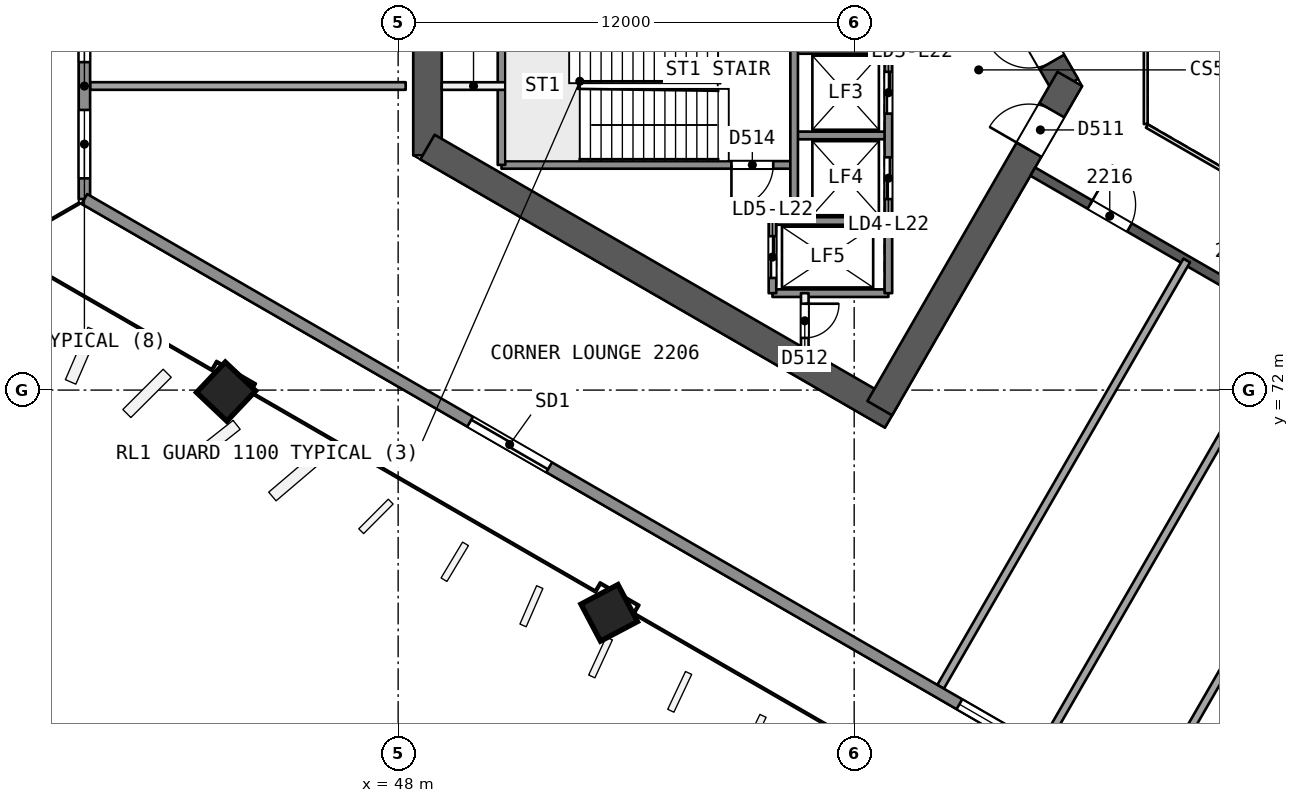
"""IFC4 building model, lengths in metres.
Left out: names, types, materials, properties, quantities, classifications, styles, units other than length and angle.
Written with IfcOpenShell. Run it as: python <this file> out.ifc"""

import sys

from ifc_helpers import new_model, si_unit, direction, frame, frame_2d, origin, origin_2d, place, context, subcontext, project, spatial, rectangle, extrude, element, fill, save


model = new_model("IFC4")
c1 = context("Model", 3, precision=1e-05, world=origin(), true_north=direction((0.0, 1.0)))
c2 = subcontext(c1, "Body", "Model", "MODEL_VIEW")
j1 = project(units=[si_unit("LENGTHUNIT", "METRE"), si_unit("PLANEANGLEUNIT", "RADIAN")], contexts=[c1])
p1 = place(None, origin())
s1 = spatial("IfcSite", under=j1, at=p1, CompositionType="ELEMENT")
p2 = place(p1, origin())
s2 = spatial("IfcBuilding", under=s1, at=p2, CompositionType="ELEMENT")
p3 = place(p2, frame((0.0, 0.0, 94.3)))
s3 = spatial("IfcBuildingStorey", under=s2, at=p3, CompositionType="ELEMENT", Elevation=94.3)
p4 = place(p3, frame((65.567, 80.0, 0.0), z_axis=(0.0, 0.0, 1.0), x_axis=(-0.499988615364, 0.866031976607, 0.0)))
e1 = element("IfcWall", 1, at=p4, inside=s3, PredefinedType="SHEAR", context=c2, shape_type="SweptSolid", body=[
    extrude(rectangle(XDim=10.163, YDim=0.75, at=frame_2d((5.082, 0.0))), origin(), (0.0, 0.0, 1.0), 3.7),
])
p5 = place(p4, frame((0.733, 0.0, 0.0)))
e2 = element("IfcOpeningElement", 2, at=p5, cuts=e1, PredefinedType="OPENING", context=c2, shape_type="SweptSolid", body=[
    extrude(rectangle(XDim=1.2, YDim=2.1, at=frame_2d((0.6, 1.05))), frame((0.0, 0.385, 0.0), z_axis=(0.0, -1.0, 0.0), x_axis=(1.0, 0.0, 0.0)), (0.0, 0.0, 1.0), 0.771),
])
p6 = place(p3, frame((48.772, 81.606, 0.0), z_axis=(0.0, 0.0, 1.0), x_axis=(0.0, -1.0, 0.0)))
e3 = element("IfcWall", 3, at=p6, inside=s3, PredefinedType="SHEAR", context=c2, shape_type="SweptSolid", body=[
    extrude(rectangle(XDim=3.429, YDim=0.75, at=frame_2d((1.714, 0.0))), origin(), (0.0, 0.0, 1.0), 3.7),
])
p7 = place(p3, frame((48.772, 78.394, 0.0), z_axis=(0.0, 0.0, 1.0), x_axis=(0.866028339916, -0.499994914436, 0.0)))
e4 = element("IfcWall", 4, at=p7, inside=s3, PredefinedType="SHEAR", context=c2, shape_type="SweptSolid", body=[
    extrude(rectangle(XDim=14.117, YDim=0.75, at=frame_2d((7.059, 0.0))), origin(), (0.0, 0.0, 1.0), 3.7),
])
p8 = place(p3, frame((60.673, 71.523, 0.0), z_axis=(0.0, 0.0, 1.0), x_axis=(0.499997052475, 0.866027105532, 0.0)))
e5 = element("IfcWall", 5, at=p8, inside=s3, PredefinedType="SHEAR", context=c2, shape_type="SweptSolid", body=[
    extrude(rectangle(XDim=10.005, YDim=0.75, at=frame_2d((5.002, 0.0))), origin(), (0.0, 0.0, 1.0), 3.7),
])
p9 = place(p8, frame((7.855, 0.0, 0.0)))
e6 = element("IfcOpeningElement", 6, at=p9, cuts=e5, PredefinedType="OPENING", context=c2, shape_type="SweptSolid", body=[
    extrude(rectangle(XDim=1.2, YDim=2.1, at=frame_2d((0.6, 1.05))), frame((0.0, 0.385, 0.0), z_axis=(0.0, -1.0, 0.0), x_axis=(1.0, 0.0, 0.0)), (0.0, 0.0, 1.0), 0.771),
])
p10 = place(p3, frame((64.7, 77.748, 0.0), z_axis=(0.0, 0.0, 1.0), x_axis=(0.866026492143, -0.499998114903, 0.0)))
e7 = element("IfcWall", 7, at=p10, inside=s3, PredefinedType="SHEAR", context=c2, shape_type="SweptSolid", body=[
    extrude(rectangle(XDim=15.588, YDim=0.25, at=frame_2d((7.794, 0.0))), origin(), (0.0, 0.0, 1.0), 3.25),
])
p11 = place(p10, frame((1.738, 0.0, 0.0)))
e8 = element("IfcOpeningElement", 8, at=p11, cuts=e7, PredefinedType="OPENING", context=c2, shape_type="SweptSolid", body=[
    extrude(rectangle(XDim=1.2, YDim=2.4, at=frame_2d((0.6, 1.2))), frame((0.0, 0.135, 0.0), z_axis=(0.0, -1.0, 0.0), x_axis=(1.0, 0.0, 0.0)), (0.0, 0.0, 1.0), 0.271),
])
p12 = place(p10, frame((5.785, 0.0, 0.0)))
e9 = element("IfcOpeningElement", 9, at=p12, cuts=e7, PredefinedType="OPENING", context=c2, shape_type="SweptSolid", body=[
    extrude(rectangle(XDim=0.9, YDim=2.1, at=frame_2d((0.45, 1.05))), frame((0.0, 0.135, 0.0), z_axis=(0.0, -1.0, 0.0), x_axis=(1.0, 0.0, 0.0)), (0.0, 0.0, 1.0), 0.271),
])
p13 = place(p10, frame((8.903, 0.0, 0.0)))
e10 = element("IfcOpeningElement", 10, at=p13, cuts=e7, PredefinedType="OPENING", context=c2, shape_type="SweptSolid", body=[
    extrude(rectangle(XDim=0.9, YDim=2.1, at=frame_2d((0.45, 1.05))), frame((0.0, 0.135, 0.0), z_axis=(0.0, -1.0, 0.0), x_axis=(1.0, 0.0, 0.0)), (0.0, 0.0, 1.0), 0.271),
])
p14 = place(p10, frame((12.75, 0.0, 0.0)))
e11 = element("IfcOpeningElement", 11, at=p14, cuts=e7, PredefinedType="OPENING", context=c2, shape_type="SweptSolid", body=[
    extrude(rectangle(XDim=1.0, YDim=2.1, at=frame_2d((0.5, 1.05))), frame((0.0, 0.135, 0.0), z_axis=(0.0, -1.0, 0.0), x_axis=(1.0, 0.0, 0.0)), (0.0, 0.0, 1.0), 0.271),
])
p15 = place(p3, frame((43.438, 71.951, 0.0), z_axis=(0.02855911485, 0.006793507689, 0.999569019734), x_axis=(-0.865319840559, 0.500766443848, 0.021319996519)))
e12 = element("IfcColumn", 12, at=p15, inside=s3, PredefinedType="COLUMN", context=c2, shape_type="SweptSolid", body=[
    extrude(rectangle(XDim=1.1, YDim=1.1, at=origin_2d()), origin(), (0.0, 0.0, 1.0), 3.702),
])
p16 = place(p3, frame((53.531, 66.124, 0.0), z_axis=(0.019262573858, 0.012138060239, 0.999740776773), x_axis=(-0.866459679623, 0.499133780995, 0.010634484378)))
e13 = element("IfcColumn", 13, at=p16, inside=s3, PredefinedType="COLUMN", context=c2, shape_type="SweptSolid", body=[
    extrude(rectangle(XDim=1.1, YDim=1.1, at=origin_2d()), origin(), (0.0, 0.0, 1.0), 3.701),
])
p17 = place(p3, frame((39.893, 80.001, 0.0), z_axis=(0.0, 0.0, 1.0), x_axis=(1.0, 0.0, 0.0)))
e14 = element("IfcWall", 14, at=p17, inside=s3, PredefinedType="PARTITIONING", context=c2, shape_type="SweptSolid", body=[
    extrude(rectangle(XDim=8.305, YDim=0.2, at=frame_2d((4.152, 0.0))), origin(), (0.0, 0.0, 1.0), 3.25),
])
for number, where, z_axis, x_axis in (
    (15, (62.274, 64.193, 0.0), (0.0, 0.0, 1.0), (0.5, 0.866, 0.0)),
    (16, (64.974, 62.634, 0.0), (0.0, 0.0, 1.0), (0.5, 0.866, 0.0)),
    (17, (67.674, 61.075, 0.0), (0.0, 0.0, 1.0), (0.5, 0.866, 0.0)),
):
    element("IfcWall", number, at=place(p3, frame(where, z_axis=z_axis, x_axis=x_axis)), inside=s3, PredefinedType="PARTITIONING", context=c2, shape_type="SweptSolid", body=[
        extrude(rectangle(XDim=12.953, YDim=0.2, at=frame_2d((6.477, 0.0))), origin(), (0.0, 0.0, 1.0), 3.25),
    ])
p18 = place(p3, frame((39.744, 77.028, 0.0), z_axis=(0.0, 0.0, 1.0), x_axis=(0.0, 1.0, 0.0)))
e18 = element("IfcWall", 18, at=p18, inside=s3, PredefinedType="SOLIDWALL", context=c2, shape_type="SweptSolid", body=[
    extrude(rectangle(XDim=5.944, YDim=0.3, at=frame_2d((2.972, 0.0))), origin(), (0.0, 0.0, 1.0), 3.25),
])
p19 = place(p18, frame((0.543, 0.0, 0.9)))
e19 = element("IfcOpeningElement", 19, at=p19, cuts=e18, PredefinedType="OPENING", context=c2, shape_type="SweptSolid", body=[
    extrude(rectangle(XDim=1.8, YDim=1.5, at=frame_2d((0.9, 0.75))), frame((0.0, 0.161, 0.0), z_axis=(0.0, -1.0, 0.0), x_axis=(1.0, 0.0, 0.0)), (0.0, 0.0, 1.0), 0.321),
])
p20 = place(p18, frame((3.601, 0.0, 0.9)))
e20 = element("IfcOpeningElement", 20, at=p20, cuts=e18, PredefinedType="OPENING", context=c2, shape_type="SweptSolid", body=[
    extrude(rectangle(XDim=1.8, YDim=1.5, at=frame_2d((0.9, 0.75))), frame((0.0, 0.161, 0.0), z_axis=(0.0, -1.0, 0.0), x_axis=(1.0, 0.0, 0.0)), (0.0, 0.0, 1.0), 0.321),
])
p21 = place(p3, frame((90.054, 47.981, 0.0), z_axis=(0.0, 0.0, 1.0), x_axis=(-0.866025390357, 0.500000023256, 0.0)))
e21 = element("IfcWall", 21, at=p21, inside=s3, PredefinedType="SOLIDWALL", context=c2, shape_type="SweptSolid", body=[
    extrude(rectangle(XDim=58.093, YDim=0.3, at=frame_2d((29.046, 0.0))), origin(), (0.0, 0.0, 1.0), 3.25),
])
p22 = place(p21, frame((43.972, 0.0, 0.0)))
e22 = element("IfcOpeningElement", 22, at=p22, cuts=e21, PredefinedType="OPENING", context=c2, shape_type="SweptSolid", body=[
    extrude(rectangle(XDim=2.4, YDim=2.4, at=frame_2d((1.2, 1.2))), frame((0.0, 0.161, 0.0), z_axis=(0.0, -1.0, 0.0), x_axis=(1.0, 0.0, 0.0)), (0.0, 0.0, 1.0), 0.321),
])
p23 = place(p21, frame((22.39, 0.0, 0.0)))
e23 = element("IfcOpeningElement", 23, at=p23, cuts=e21, PredefinedType="OPENING", context=c2, shape_type="SweptSolid", body=[
    extrude(rectangle(XDim=2.4, YDim=2.4, at=frame_2d((1.2, 1.2))), frame((0.0, 0.161, 0.0), z_axis=(0.0, -1.0, 0.0), x_axis=(1.0, 0.0, 0.0)), (0.0, 0.0, 1.0), 0.321),
])
p24 = place(p21, frame((10.643, 0.0, 0.0)))
e24 = element("IfcOpeningElement", 24, at=p24, cuts=e21, PredefinedType="OPENING", context=c2, shape_type="SweptSolid", body=[
    extrude(rectangle(XDim=2.4, YDim=2.4, at=frame_2d((1.2, 1.2))), frame((0.0, 0.161, 0.0), z_axis=(0.0, -1.0, 0.0), x_axis=(1.0, 0.0, 0.0)), (0.0, 0.0, 1.0), 0.321),
])
p25 = place(p21, frame((29.705, 0.0, 0.9)))
e25 = element("IfcOpeningElement", 25, at=p25, cuts=e21, PredefinedType="OPENING", context=c2, shape_type="SweptSolid", body=[
    extrude(rectangle(XDim=1.8, YDim=1.5, at=frame_2d((0.9, 0.75))), frame((0.0, 0.161, 0.0), z_axis=(0.0, -1.0, 0.0), x_axis=(1.0, 0.0, 0.0)), (0.0, 0.0, 1.0), 0.321),
])
p26 = place(p21, frame((26.587, 0.0, 0.9)))
e26 = element("IfcOpeningElement", 26, at=p26, cuts=e21, PredefinedType="OPENING", context=c2, shape_type="SweptSolid", body=[
    extrude(rectangle(XDim=1.8, YDim=1.5, at=frame_2d((0.9, 0.75))), frame((0.0, 0.161, 0.0), z_axis=(0.0, -1.0, 0.0), x_axis=(1.0, 0.0, 0.0)), (0.0, 0.0, 1.0), 0.321),
])
p27 = place(p3, frame((60.9, 80.95, 0.0), z_axis=(0.0, 0.0, 1.0), x_axis=(-1.0, 0.0, 0.0)))
e27 = element("IfcWall", 27, at=p27, inside=s3, PredefinedType="SOLIDWALL", context=c2, shape_type="SweptSolid", body=[
    extrude(rectangle(XDim=2.48, YDim=0.2, at=frame_2d((1.24, 0.0))), origin(), (0.0, 0.0, 1.0), 3.25),
])
p28 = place(p3, frame((50.82, 80.0, 0.0), z_axis=(0.0, 0.0, 1.0), x_axis=(-1.0, 0.0, 0.0)))
e28 = element("IfcWall", 28, at=p28, inside=s3, PredefinedType="PARTITIONING", context=c2, shape_type="SweptSolid", body=[
    extrude(rectangle(XDim=1.673, YDim=0.2, at=frame_2d((0.836, 0.0))), origin(), (0.0, 0.0, 1.0), 3.25),
])
p29 = place(p3, frame((60.9, 78.7, 0.0), z_axis=(0.0, 0.0, 1.0), x_axis=(-1.0, 0.0, 0.0)))
e29 = element("IfcWall", 29, at=p29, inside=s3, PredefinedType="SOLIDWALL", context=c2, shape_type="SweptSolid", body=[
    extrude(rectangle(XDim=2.48, YDim=0.2, at=frame_2d((1.24, 0.0))), origin(), (0.0, 0.0, 1.0), 3.25),
])
p30 = place(p3, frame((58.42, 77.925, 0.0), z_axis=(0.0, 0.0, 1.0), x_axis=(-1.0, 0.0, 0.0)))
e30 = element("IfcWall", 30, at=p30, inside=s3, PredefinedType="SOLIDWALL", context=c2, shape_type="SweptSolid", body=[
    extrude(rectangle(XDim=7.7, YDim=0.2, at=frame_2d((3.85, 0.0))), origin(), (0.0, 0.0, 1.0), 3.25),
])
p31 = place(p30, frame((0.55, 0.0, 0.0)))
e31 = element("IfcOpeningElement", 31, at=p31, cuts=e30, PredefinedType="OPENING", context=c2, shape_type="SweptSolid", body=[
    extrude(rectangle(XDim=1.1, YDim=2.1, at=frame_2d((0.55, 1.05))), frame((0.0, 0.11, 0.0), z_axis=(0.0, -1.0, 0.0), x_axis=(1.0, 0.0, 0.0)), (0.0, 0.0, 1.0), 0.221),
])
for number, where, z_axis, x_axis in (
    (32, (60.9, 76.45, 0.0), (0.0, 0.0, 1.0), (-1.0, 0.0, 0.0)),
    (33, (60.9, 74.55, 0.0), (0.0, 0.0, 1.0), (-1.0, 0.0, 0.0)),
):
    element("IfcWall", number, at=place(p3, frame(where, z_axis=z_axis, x_axis=x_axis)), inside=s3, PredefinedType="SOLIDWALL", context=c2, shape_type="SweptSolid", body=[
        extrude(rectangle(XDim=3.05, YDim=0.2, at=frame_2d((1.525, 0.0))), origin(), (0.0, 0.0, 1.0), 3.25),
    ])
p32 = place(p3, frame((60.9, 85.45, 0.0), z_axis=(0.0, 0.0, 1.0), x_axis=(0.0, -1.0, 0.0)))
e34 = element("IfcWall", 34, at=p32, inside=s3, PredefinedType="SOLIDWALL", context=c2, shape_type="SweptSolid", body=[
    extrude(rectangle(XDim=10.9, YDim=0.2, at=frame_2d((5.45, 0.0))), origin(), (0.0, 0.0, 1.0), 3.25),
])
p33 = place(p32, frame((0.575, 0.0, 0.0)))
e35 = element("IfcOpeningElement", 35, at=p33, cuts=e34, PredefinedType="OPENING", context=c2, shape_type="SweptSolid", body=[
    extrude(rectangle(XDim=1.1, YDim=2.1, at=frame_2d((0.55, 1.05))), frame((0.0, 0.11, 0.0), z_axis=(0.0, -1.0, 0.0), x_axis=(1.0, 0.0, 0.0)), (0.0, 0.0, 1.0), 0.221),
])
p34 = place(p32, frame((2.825, 0.0, 0.0)))
e36 = element("IfcOpeningElement", 36, at=p34, cuts=e34, PredefinedType="OPENING", context=c2, shape_type="SweptSolid", body=[
    extrude(rectangle(XDim=1.1, YDim=2.1, at=frame_2d((0.55, 1.05))), frame((0.0, 0.11, 0.0), z_axis=(0.0, -1.0, 0.0), x_axis=(1.0, 0.0, 0.0)), (0.0, 0.0, 1.0), 0.221),
])
p35 = place(p32, frame((5.075, 0.0, 0.0)))
e37 = element("IfcOpeningElement", 37, at=p35, cuts=e34, PredefinedType="OPENING", context=c2, shape_type="SweptSolid", body=[
    extrude(rectangle(XDim=1.1, YDim=2.1, at=frame_2d((0.55, 1.05))), frame((0.0, 0.11, 0.0), z_axis=(0.0, -1.0, 0.0), x_axis=(1.0, 0.0, 0.0)), (0.0, 0.0, 1.0), 0.221),
])
p36 = place(p32, frame((7.325, 0.0, 0.0)))
e38 = element("IfcOpeningElement", 38, at=p36, cuts=e34, PredefinedType="OPENING", context=c2, shape_type="SweptSolid", body=[
    extrude(rectangle(XDim=1.1, YDim=2.1, at=frame_2d((0.55, 1.05))), frame((0.0, 0.11, 0.0), z_axis=(0.0, -1.0, 0.0), x_axis=(1.0, 0.0, 0.0)), (0.0, 0.0, 1.0), 0.221),
])
p37 = place(p3, frame((58.7, 74.55, 0.0), z_axis=(0.0, 0.0, 1.0), x_axis=(0.0, -1.0, 0.0)))
e39 = element("IfcWall", 39, at=p37, inside=s3, PredefinedType="PARTITIONING", context=c2, shape_type="SweptSolid", body=[
    extrude(rectangle(XDim=1.455, YDim=0.2, at=frame_2d((0.728, 0.0))), origin(), (0.0, 0.0, 1.0), 3.25),
])
p38 = place(p37, frame((0.278, 0.0, 0.0)))
e40 = element("IfcOpeningElement", 40, at=p38, cuts=e39, PredefinedType="OPENING", context=c2, shape_type="SweptSolid", body=[
    extrude(rectangle(XDim=0.9, YDim=2.1, at=frame_2d((0.45, 1.05))), frame((0.0, 0.11, 0.0), z_axis=(0.0, -1.0, 0.0), x_axis=(1.0, 0.0, 0.0)), (0.0, 0.0, 1.0), 0.221),
])
p39 = place(p3, frame((58.42, 85.45, 0.0), z_axis=(0.0, 0.0, 1.0), x_axis=(0.0, -1.0, 0.0)))
e41 = element("IfcWall", 41, at=p39, inside=s3, PredefinedType="SOLIDWALL", context=c2, shape_type="SweptSolid", body=[
    extrude(rectangle(XDim=9.0, YDim=0.2, at=frame_2d((4.5, 0.0))), origin(), (0.0, 0.0, 1.0), 3.25),
])
p40 = place(p3, frame((57.85, 76.45, 0.0), z_axis=(0.0, 0.0, 1.0), x_axis=(0.0, -1.0, 0.0)))
e42 = element("IfcWall", 42, at=p40, inside=s3, PredefinedType="SOLIDWALL", context=c2, shape_type="SweptSolid", body=[
    extrude(rectangle(XDim=1.9, YDim=0.2, at=frame_2d((0.95, 0.0))), origin(), (0.0, 0.0, 1.0), 3.25),
])
p41 = place(p40, frame((0.4, 0.0, 0.0)))
e43 = element("IfcOpeningElement", 43, at=p41, cuts=e42, PredefinedType="OPENING", context=c2, shape_type="SweptSolid", body=[
    extrude(rectangle(XDim=1.1, YDim=2.1, at=frame_2d((0.55, 1.05))), frame((0.0, 0.11, 0.0), z_axis=(0.0, -1.0, 0.0), x_axis=(1.0, 0.0, 0.0)), (0.0, 0.0, 1.0), 0.221),
])
p42 = place(p3, frame((50.72, 82.075, 0.0), z_axis=(0.0, 0.0, 1.0), x_axis=(0.0, -1.0, 0.0)))
e44 = element("IfcWall", 44, at=p42, inside=s3, PredefinedType="SOLIDWALL", context=c2, shape_type="SweptSolid", body=[
    extrude(rectangle(XDim=4.15, YDim=0.2, at=frame_2d((2.075, 0.0))), origin(), (0.0, 0.0, 1.0), 3.25),
])
p43 = place(p3, frame((67.672, 81.0, 0.0), z_axis=(0.0, 0.0, 1.0), x_axis=(0.0, -1.0, 0.0)))
e45 = element("IfcWall", 45, at=p43, inside=s3, PredefinedType="PARTITIONING", context=c2, shape_type="SweptSolid", body=[
    extrude(rectangle(XDim=2.0, YDim=0.1, at=frame_2d((1.0, 0.0))), origin(), (0.0, 0.0, 1.0), 3.25),
])
p44 = place(p3, frame((67.702, 78.948, 0.0), z_axis=(0.0, 0.0, 1.0), x_axis=(0.866026658274, -0.499997827154, 0.0)))
e46 = element("IfcWall", 46, at=p44, inside=s3, PredefinedType="PARTITIONING", context=c2, shape_type="SweptSolid", body=[
    extrude(rectangle(XDim=11.588, YDim=0.1, at=frame_2d((5.794, 0.0))), origin(), (0.0, 0.0, 1.0), 3.25),
])
p45 = place(p11, origin())
e47 = element("IfcDoor", 47, at=p45, inside=s3, OperationType="SINGLE_SWING_LEFT", PredefinedType="NOTDEFINED", context=c2, shape_type="SweptSolid", body=[
    extrude(rectangle(XDim=1.2, YDim=2.4, at=frame_2d((0.6, 1.2))), frame((0.0, 0.025, 0.0), z_axis=(0.0, -1.0, 0.0), x_axis=(1.0, 0.0, 0.0)), (0.0, 0.0, 1.0), 0.05),
])
fill(e8, e47)
p46 = place(p19, origin())
e48 = element("IfcWindow", 48, at=p46, inside=s3, PartitioningType="SINGLE_PANEL", PredefinedType="WINDOW", context=c2, shape_type="SweptSolid", body=[
    extrude(rectangle(XDim=1.8, YDim=1.5, at=frame_2d((0.9, 0.75))), frame((0.0, 0.03, 0.0), z_axis=(0.0, -1.0, 0.0), x_axis=(1.0, 0.0, 0.0)), (0.0, 0.0, 1.0), 0.06),
])
fill(e19, e48)
p47 = place(p20, origin())
e49 = element("IfcWindow", 49, at=p47, inside=s3, PartitioningType="SINGLE_PANEL", PredefinedType="WINDOW", context=c2, shape_type="SweptSolid", body=[
    extrude(rectangle(XDim=1.8, YDim=1.5, at=frame_2d((0.9, 0.75))), frame((0.0, 0.03, 0.0), z_axis=(0.0, -1.0, 0.0), x_axis=(1.0, 0.0, 0.0)), (0.0, 0.0, 1.0), 0.06),
])
fill(e20, e49)
p48 = place(p22, origin())
e50 = element("IfcDoor", 50, at=p48, inside=s3, OperationType="SLIDING_TO_LEFT", PredefinedType="NOTDEFINED", context=c2, shape_type="SweptSolid", body=[
    extrude(rectangle(XDim=2.4, YDim=2.4, at=frame_2d((1.2, 1.2))), frame((0.0, 0.025, 0.0), z_axis=(0.0, -1.0, 0.0), x_axis=(1.0, 0.0, 0.0)), (0.0, 0.0, 1.0), 0.05),
])
fill(e22, e50)
p49 = place(p25, origin())
e51 = element("IfcWindow", 51, at=p49, inside=s3, PartitioningType="SINGLE_PANEL", PredefinedType="WINDOW", context=c2, shape_type="SweptSolid", body=[
    extrude(rectangle(XDim=1.8, YDim=1.5, at=frame_2d((0.9, 0.75))), frame((0.0, 0.03, 0.0), z_axis=(0.0, -1.0, 0.0), x_axis=(1.0, 0.0, 0.0)), (0.0, 0.0, 1.0), 0.06),
])
fill(e25, e51)
p50 = place(p5, origin())
e52 = element("IfcDoor", 52, at=p50, inside=s3, OperationType="SINGLE_SWING_RIGHT", PredefinedType="NOTDEFINED", context=c2, shape_type="SweptSolid", body=[
    extrude(rectangle(XDim=1.2, YDim=2.1, at=frame_2d((0.6, 1.05))), frame((0.0, 0.025, 0.0), z_axis=(0.0, -1.0, 0.0), x_axis=(1.0, 0.0, 0.0)), (0.0, 0.0, 1.0), 0.05),
])
fill(e2, e52)
p51 = place(p9, origin())
e53 = element("IfcDoor", 53, at=p51, inside=s3, OperationType="SINGLE_SWING_LEFT", PredefinedType="NOTDEFINED", context=c2, shape_type="SweptSolid", body=[
    extrude(rectangle(XDim=1.2, YDim=2.1, at=frame_2d((0.6, 1.05))), frame((0.0, 0.025, 0.0), z_axis=(0.0, -1.0, 0.0), x_axis=(1.0, 0.0, 0.0)), (0.0, 0.0, 1.0), 0.05),
])
fill(e6, e53)
p52 = place(p35, origin())
e54 = element("IfcDoor", 54, at=p52, inside=s3, OperationType="SLIDING_TO_RIGHT", PredefinedType="NOTDEFINED", context=c2, shape_type="SweptSolid", body=[
    extrude(rectangle(XDim=1.1, YDim=2.1, at=frame_2d((0.55, 1.05))), frame((0.0, 0.025, 0.0), z_axis=(0.0, -1.0, 0.0), x_axis=(1.0, 0.0, 0.0)), (0.0, 0.0, 1.0), 0.05),
])
fill(e37, e54)
p53 = place(p36, origin())
e55 = element("IfcDoor", 55, at=p53, inside=s3, OperationType="SLIDING_TO_LEFT", PredefinedType="NOTDEFINED", context=c2, shape_type="SweptSolid", body=[
    extrude(rectangle(XDim=1.1, YDim=2.1, at=frame_2d((0.55, 1.05))), frame((0.0, 0.025, 0.0), z_axis=(0.0, -1.0, 0.0), x_axis=(1.0, 0.0, 0.0)), (0.0, 0.0, 1.0), 0.05),
])
fill(e38, e55)
p54 = place(p41, origin())
e56 = element("IfcDoor", 56, at=p54, inside=s3, OperationType="SLIDING_TO_RIGHT", PredefinedType="NOTDEFINED", context=c2, shape_type="SweptSolid", body=[
    extrude(rectangle(XDim=1.1, YDim=2.1, at=frame_2d((0.55, 1.05))), frame((0.0, 0.025, 0.0), z_axis=(0.0, -1.0, 0.0), x_axis=(1.0, 0.0, 0.0)), (0.0, 0.0, 1.0), 0.05),
])
fill(e43, e56)
p55 = place(p38, origin())
e57 = element("IfcDoor", 57, at=p55, inside=s3, OperationType="SINGLE_SWING_LEFT", PredefinedType="NOTDEFINED", context=c2, shape_type="SweptSolid", body=[
    extrude(rectangle(XDim=0.9, YDim=2.1, at=frame_2d((0.45, 1.05))), frame((0.0, 0.025, 0.0), z_axis=(0.0, -1.0, 0.0), x_axis=(1.0, 0.0, 0.0)), (0.0, 0.0, 1.0), 0.05),
])
fill(e40, e57)
p56 = place(p31, origin())
e58 = element("IfcDoor", 58, at=p56, inside=s3, OperationType="SINGLE_SWING_RIGHT", PredefinedType="NOTDEFINED", context=c2, shape_type="SweptSolid", body=[
    extrude(rectangle(XDim=1.1, YDim=2.1, at=frame_2d((0.55, 1.05))), frame((0.0, 0.025, 0.0), z_axis=(0.0, -1.0, 0.0), x_axis=(1.0, 0.0, 0.0)), (0.0, 0.0, 1.0), 0.05),
])
fill(e31, e58)
save(model, sys.argv[1])
